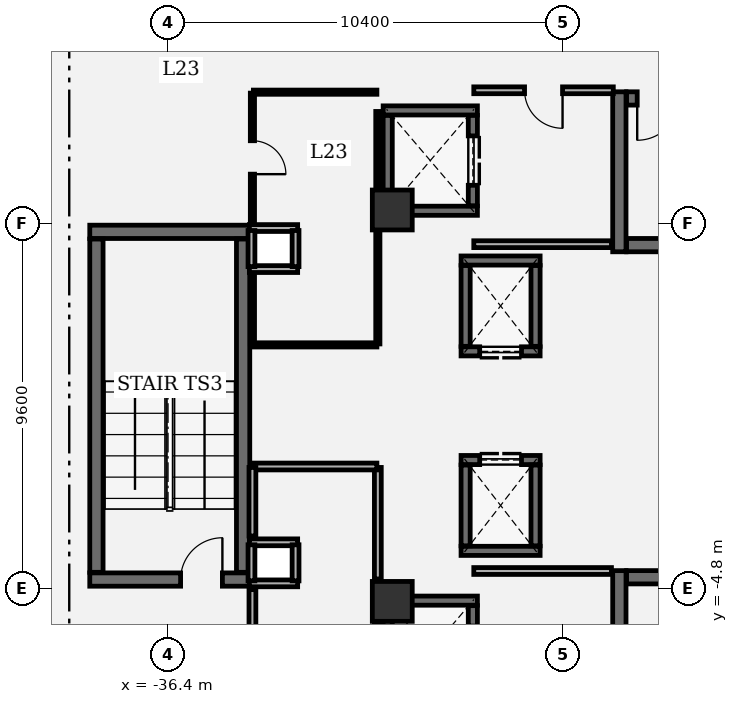
"""IFC4 building model, lengths in metres.
Left out: names, types, materials, properties, quantities, classifications, styles, units other than length and angle.
Written with IfcOpenShell. Run it as: python <this file> out.ifc"""

import sys

from ifc_helpers import new_model, si_unit, direction, frame, frame_2d, origin, origin_2d, place, context, subcontext, project, spatial, rectangle, extrude, element, fill, save


model = new_model("IFC4")
c1 = context("Model", 3, precision=1e-05, world=origin(), true_north=direction((0.0, 1.0)))
c2 = subcontext(c1, "Body", "Model", "MODEL_VIEW")
j1 = project(units=[si_unit("LENGTHUNIT", "METRE"), si_unit("PLANEANGLEUNIT", "RADIAN")], contexts=[c1])
p1 = place(None, origin())
s1 = spatial("IfcSite", under=j1, at=p1, CompositionType="ELEMENT")
p2 = place(p1, origin())
s2 = spatial("IfcBuilding", under=s1, at=p2, CompositionType="ELEMENT")
p3 = place(p2, frame((0.0, 0.0, 105.0)))
s3 = spatial("IfcBuildingStorey", under=s2, at=p3, CompositionType="ELEMENT", Elevation=105.0)
for number, where, z_axis, x_axis in (
    (1, (-30.5, 5.15, 0.0), (0.0, 0.0, 1.0), (1.0, 0.0, 0.0)),
    (2, (-30.5, -5.15, 0.0), (0.0, 0.0, 1.0), (1.0, 0.0, 0.0)),
):
    element("IfcColumn", number, at=place(p3, frame(where, z_axis=z_axis, x_axis=x_axis)), inside=s3, PredefinedType="COLUMN", context=c2, shape_type="SweptSolid", body=[
        extrude(rectangle(XDim=1.05, YDim=1.05, at=origin_2d()), origin(), (0.0, 0.0, 1.0), 4.8),
    ])
p4 = place(p3, frame((-24.525, 8.26, 0.0), z_axis=(0.0, 0.0, 1.0), x_axis=(0.0, -1.0, 0.0)))
e3 = element("IfcWall", 3, at=p4, inside=s3, PredefinedType="SHEAR", context=c2, shape_type="SweptSolid", body=[
    extrude(rectangle(XDim=4.21, YDim=0.35, at=frame_2d((2.105, 0.0))), origin(), (0.0, 0.0, 1.0), 4.52),
])
p5 = place(p3, frame((-24.335, 4.225, 0.0), z_axis=(0.0, 0.0, 1.0), x_axis=(1.0, 0.0, 0.0)))
e4 = element("IfcWall", 4, at=p5, inside=s3, PredefinedType="SHEAR", context=c2, shape_type="SweptSolid", body=[
    extrude(rectangle(XDim=8.12, YDim=0.35, at=frame_2d((4.06, 0.0))), origin(), (0.0, 0.0, 1.0), 4.52),
])
p6 = place(p3, frame((-16.215, 8.085, 0.0), z_axis=(0.0, 0.0, 1.0), x_axis=(-1.0, 0.0, 0.0)))
e5 = element("IfcWall", 5, at=p6, inside=s3, PredefinedType="SHEAR", context=c2, shape_type="SweptSolid", body=[
    extrude(rectangle(XDim=8.12, YDim=0.35, at=frame_2d((4.06, 0.0))), origin(), (0.0, 0.0, 1.0), 4.52),
])
p7 = place(p6, frame((6.74, 0.0, 0.0)))
e6 = element("IfcOpeningElement", 6, at=p7, cuts=e5, PredefinedType="OPENING", context=c2, shape_type="SweptSolid", body=[
    extrude(rectangle(XDim=1.1, YDim=2.2, at=frame_2d((0.55, 1.1))), frame((0.0, 0.185, 0.0), z_axis=(0.0, -1.0, 0.0), x_axis=(1.0, 0.0, 0.0)), (0.0, 0.0, 1.0), 0.37),
])
p8 = place(p3, frame((-24.525, -4.34, 0.0), z_axis=(0.0, 0.0, 1.0), x_axis=(0.0, -1.0, 0.0)))
e7 = element("IfcWall", 7, at=p8, inside=s3, PredefinedType="SHEAR", context=c2, shape_type="SweptSolid", body=[
    extrude(rectangle(XDim=4.21, YDim=0.35, at=frame_2d((2.105, 0.0))), origin(), (0.0, 0.0, 1.0), 4.52),
])
p9 = place(p3, frame((-16.215, -4.515, 0.0), z_axis=(0.0, 0.0, 1.0), x_axis=(-1.0, 0.0, 0.0)))
e8 = element("IfcWall", 8, at=p9, inside=s3, PredefinedType="SHEAR", context=c2, shape_type="SweptSolid", body=[
    extrude(rectangle(XDim=8.12, YDim=0.35, at=frame_2d((4.06, 0.0))), origin(), (0.0, 0.0, 1.0), 4.52),
])
p10 = place(p3, frame((-38.46, -4.575, 0.0), z_axis=(0.0, 0.0, 1.0), x_axis=(1.0, 0.0, 0.0)))
e9 = element("IfcWall", 9, at=p10, inside=s3, PredefinedType="SHEAR", context=c2, shape_type="SweptSolid", body=[
    extrude(rectangle(XDim=4.21, YDim=0.35, at=frame_2d((2.105, 0.0))), origin(), (0.0, 0.0, 1.0), 4.52),
])
p11 = place(p10, frame((2.39, 0.0, 0.0)))
e10 = element("IfcOpeningElement", 10, at=p11, cuts=e9, PredefinedType="OPENING", context=c2, shape_type="SweptSolid", body=[
    extrude(rectangle(XDim=1.1, YDim=2.2, at=frame_2d((0.55, 1.1))), frame((0.0, 0.185, 0.0), z_axis=(0.0, -1.0, 0.0), x_axis=(1.0, 0.0, 0.0)), (0.0, 0.0, 1.0), 0.37),
])
p12 = place(p3, frame((-34.25, 4.575, 0.0), z_axis=(0.0, 0.0, 1.0), x_axis=(-1.0, 0.0, 0.0)))
e11 = element("IfcWall", 11, at=p12, inside=s3, PredefinedType="SHEAR", context=c2, shape_type="SweptSolid", body=[
    extrude(rectangle(XDim=4.21, YDim=0.35, at=frame_2d((2.105, 0.0))), origin(), (0.0, 0.0, 1.0), 4.52),
])
for number, where, z_axis, x_axis in (
    (12, (-34.425, -4.385, 0.0), (0.0, 0.0, 1.0), (0.0, 1.0, 0.0)),
    (13, (-38.285, 4.385, 0.0), (0.0, 0.0, 1.0), (0.0, -1.0, 0.0)),
):
    element("IfcWall", number, at=place(p3, frame(where, z_axis=z_axis, x_axis=x_axis)), inside=s3, PredefinedType="SHEAR", context=c2, shape_type="SweptSolid", body=[
        extrude(rectangle(XDim=8.77, YDim=0.35, at=frame_2d((4.385, 0.0))), origin(), (0.0, 0.0, 1.0), 4.52),
    ])
for number, where, z_axis, x_axis in (
    (14, (-28.26, 5.13, 0.0), (0.0, 0.0, 1.0), (-1.0, 0.0, 0.0)),
    (15, (-30.74, 7.77, 0.0), (0.0, 0.0, 1.0), (1.0, 0.0, 0.0)),
):
    element("IfcWall", number, at=place(p3, frame(where, z_axis=z_axis, x_axis=x_axis)), inside=s3, PredefinedType="SHEAR", context=c2, shape_type="SweptSolid", body=[
        extrude(rectangle(XDim=2.48, YDim=0.24, at=frame_2d((1.24, 0.0))), origin(), (0.0, 0.0, 1.0), 4.52),
    ])
p13 = place(p3, frame((-30.62, 5.262, 0.0), z_axis=(0.0, 0.0, 1.0), x_axis=(0.0, 1.0, 0.0)))
e16 = element("IfcWall", 16, at=p13, inside=s3, PredefinedType="SHEAR", context=c2, shape_type="SweptSolid", body=[
    extrude(rectangle(XDim=2.376, YDim=0.24, at=frame_2d((1.188, 0.0))), origin(), (0.0, 0.0, 1.0), 4.52),
])
p14 = place(p3, frame((-28.38, 7.638, 0.0), z_axis=(0.0, 0.0, 1.0), x_axis=(0.0, -1.0, 0.0)))
e17 = element("IfcWall", 17, at=p14, inside=s3, PredefinedType="SHEAR", context=c2, shape_type="SweptSolid", body=[
    extrude(rectangle(XDim=2.376, YDim=0.24, at=frame_2d((1.188, 0.0))), origin(), (0.0, 0.0, 1.0), 4.52),
])
p15 = place(p14, frame((0.538, 0.0, 0.0)))
e18 = element("IfcOpeningElement", 18, at=p15, cuts=e17, PredefinedType="OPENING", context=c2, shape_type="SweptSolid", body=[
    extrude(rectangle(XDim=1.3, YDim=2.3, at=frame_2d((0.65, 1.15))), frame((0.0, 0.13, 0.0), z_axis=(0.0, -1.0, 0.0), x_axis=(1.0, 0.0, 0.0)), (0.0, 0.0, 1.0), 0.26),
])
p16 = place(p3, frame((-30.74, -5.13, 0.0), z_axis=(0.0, 0.0, 1.0), x_axis=(1.0, 0.0, 0.0)))
e19 = element("IfcWall", 19, at=p16, inside=s3, PredefinedType="SHEAR", context=c2, shape_type="SweptSolid", body=[
    extrude(rectangle(XDim=2.48, YDim=0.24, at=frame_2d((1.24, 0.0))), origin(), (0.0, 0.0, 1.0), 4.52),
])
p17 = place(p3, frame((-30.62, -7.638, 0.0), z_axis=(0.0, 0.0, 1.0), x_axis=(0.0, 1.0, 0.0)))
e20 = element("IfcWall", 20, at=p17, inside=s3, PredefinedType="SHEAR", context=c2, shape_type="SweptSolid", body=[
    extrude(rectangle(XDim=2.376, YDim=0.24, at=frame_2d((1.188, 0.0))), origin(), (0.0, 0.0, 1.0), 4.52),
])
p18 = place(p3, frame((-28.38, -5.262, 0.0), z_axis=(0.0, 0.0, 1.0), x_axis=(0.0, -1.0, 0.0)))
e21 = element("IfcWall", 21, at=p18, inside=s3, PredefinedType="SHEAR", context=c2, shape_type="SweptSolid", body=[
    extrude(rectangle(XDim=2.376, YDim=0.24, at=frame_2d((1.188, 0.0))), origin(), (0.0, 0.0, 1.0), 4.52),
])
p19 = place(p18, frame((0.538, 0.0, 0.0)))
e22 = element("IfcOpeningElement", 22, at=p19, cuts=e21, PredefinedType="OPENING", context=c2, shape_type="SweptSolid", body=[
    extrude(rectangle(XDim=1.3, YDim=2.3, at=frame_2d((0.65, 1.15))), frame((0.0, 0.13, 0.0), z_axis=(0.0, -1.0, 0.0), x_axis=(1.0, 0.0, 0.0)), (0.0, 0.0, 1.0), 0.26),
])
p20 = place(p3, frame((-26.61, 1.43, 0.0), z_axis=(0.0, 0.0, 1.0), x_axis=(-1.0, 0.0, 0.0)))
e23 = element("IfcWall", 23, at=p20, inside=s3, PredefinedType="SHEAR", context=c2, shape_type="SweptSolid", body=[
    extrude(rectangle(XDim=2.08, YDim=0.24, at=frame_2d((1.04, 0.0))), origin(), (0.0, 0.0, 1.0), 4.52),
])
p21 = place(p20, frame((0.49, 0.0, 0.0)))
e24 = element("IfcOpeningElement", 24, at=p21, cuts=e23, PredefinedType="OPENING", context=c2, shape_type="SweptSolid", body=[
    extrude(rectangle(XDim=1.1, YDim=2.2, at=frame_2d((0.55, 1.1))), frame((0.0, 0.13, 0.0), z_axis=(0.0, -1.0, 0.0), x_axis=(1.0, 0.0, 0.0)), (0.0, 0.0, 1.0), 0.26),
])
p22 = place(p3, frame((-28.69, 3.82, 0.0), z_axis=(0.0, 0.0, 1.0), x_axis=(1.0, 0.0, 0.0)))
e25 = element("IfcWall", 25, at=p22, inside=s3, PredefinedType="SHEAR", context=c2, shape_type="SweptSolid", body=[
    extrude(rectangle(XDim=2.08, YDim=0.24, at=frame_2d((1.04, 0.0))), origin(), (0.0, 0.0, 1.0), 4.52),
])
for number, where, z_axis, x_axis in (
    (26, (-28.57, 1.562, 0.0), (0.0, 0.0, 1.0), (0.0, 1.0, 0.0)),
    (27, (-26.73, 3.688, 0.0), (0.0, 0.0, 1.0), (0.0, -1.0, 0.0)),
):
    element("IfcWall", number, at=place(p3, frame(where, z_axis=z_axis, x_axis=x_axis)), inside=s3, PredefinedType="SHEAR", context=c2, shape_type="SweptSolid", body=[
        extrude(rectangle(XDim=2.126, YDim=0.24, at=frame_2d((1.063, 0.0))), origin(), (0.0, 0.0, 1.0), 4.52),
    ])
p23 = place(p3, frame((-26.61, -3.82, 0.0), z_axis=(0.0, 0.0, 1.0), x_axis=(-1.0, 0.0, 0.0)))
e28 = element("IfcWall", 28, at=p23, inside=s3, PredefinedType="SHEAR", context=c2, shape_type="SweptSolid", body=[
    extrude(rectangle(XDim=2.08, YDim=0.24, at=frame_2d((1.04, 0.0))), origin(), (0.0, 0.0, 1.0), 4.52),
])
p24 = place(p3, frame((-28.69, -1.43, 0.0), z_axis=(0.0, 0.0, 1.0), x_axis=(1.0, 0.0, 0.0)))
e29 = element("IfcWall", 29, at=p24, inside=s3, PredefinedType="SHEAR", context=c2, shape_type="SweptSolid", body=[
    extrude(rectangle(XDim=2.08, YDim=0.24, at=frame_2d((1.04, 0.0))), origin(), (0.0, 0.0, 1.0), 4.52),
])
p25 = place(p24, frame((0.49, 0.0, 0.0)))
e30 = element("IfcOpeningElement", 30, at=p25, cuts=e29, PredefinedType="OPENING", context=c2, shape_type="SweptSolid", body=[
    extrude(rectangle(XDim=1.1, YDim=2.2, at=frame_2d((0.55, 1.1))), frame((0.0, 0.13, 0.0), z_axis=(0.0, -1.0, 0.0), x_axis=(1.0, 0.0, 0.0)), (0.0, 0.0, 1.0), 0.26),
])
for number, where, z_axis, x_axis in (
    (31, (-28.57, -3.688, 0.0), (0.0, 0.0, 1.0), (0.0, 1.0, 0.0)),
    (32, (-26.73, -1.562, 0.0), (0.0, 0.0, 1.0), (0.0, -1.0, 0.0)),
):
    element("IfcWall", number, at=place(p3, frame(where, z_axis=z_axis, x_axis=x_axis)), inside=s3, PredefinedType="SHEAR", context=c2, shape_type="SweptSolid", body=[
        extrude(rectangle(XDim=2.126, YDim=0.24, at=frame_2d((1.063, 0.0))), origin(), (0.0, 0.0, 1.0), 4.52),
    ])
for number, where, z_axis, x_axis in (
    (33, (-32.99, 3.595, 0.0), (0.0, 0.0, 1.0), (-1.0, 0.0, 0.0)),
    (34, (-34.26, 4.675, 0.0), (0.0, 0.0, 1.0), (1.0, 0.0, 0.0)),
):
    element("IfcWall", number, at=place(p3, frame(where, z_axis=z_axis, x_axis=x_axis)), inside=s3, PredefinedType="PARTITIONING", context=c2, shape_type="SweptSolid", body=[
        extrude(rectangle(XDim=1.27, YDim=0.18, at=frame_2d((0.635, 0.0))), origin(), (0.0, 0.0, 1.0), 4.52),
    ])
for number, where, z_axis, x_axis in (
    (35, (-34.205, 3.66, 0.0), (0.0, 0.0, 1.0), (0.0, 1.0, 0.0)),
    (36, (-33.045, 4.61, 0.0), (0.0, 0.0, 1.0), (0.0, -1.0, 0.0)),
):
    element("IfcWall", number, at=place(p3, frame(where, z_axis=z_axis, x_axis=x_axis)), inside=s3, PredefinedType="PARTITIONING", context=c2, shape_type="SweptSolid", body=[
        extrude(rectangle(XDim=0.95, YDim=0.18, at=frame_2d((0.475, 0.0))), origin(), (0.0, 0.0, 1.0), 4.52),
    ])
for number, where, z_axis, x_axis in (
    (37, (-32.99, -4.675, 0.0), (0.0, 0.0, 1.0), (-1.0, 0.0, 0.0)),
    (38, (-34.26, -3.595, 0.0), (0.0, 0.0, 1.0), (1.0, 0.0, 0.0)),
):
    element("IfcWall", number, at=place(p3, frame(where, z_axis=z_axis, x_axis=x_axis)), inside=s3, PredefinedType="PARTITIONING", context=c2, shape_type="SweptSolid", body=[
        extrude(rectangle(XDim=1.27, YDim=0.18, at=frame_2d((0.635, 0.0))), origin(), (0.0, 0.0, 1.0), 4.52),
    ])
for number, where, z_axis, x_axis in (
    (39, (-34.205, -4.61, 0.0), (0.0, 0.0, 1.0), (0.0, 1.0, 0.0)),
    (40, (-33.045, -3.66, 0.0), (0.0, 0.0, 1.0), (0.0, -1.0, 0.0)),
):
    element("IfcWall", number, at=place(p3, frame(where, z_axis=z_axis, x_axis=x_axis)), inside=s3, PredefinedType="PARTITIONING", context=c2, shape_type="SweptSolid", body=[
        extrude(rectangle(XDim=0.95, YDim=0.18, at=frame_2d((0.475, 0.0))), origin(), (0.0, 0.0, 1.0), 4.52),
    ])
p26 = place(p3, frame((-28.355, 4.25, 0.0), z_axis=(0.0, 0.0, 1.0), x_axis=(1.0, 0.0, 0.0)))
e41 = element("IfcWall", 41, at=p26, inside=s3, PredefinedType="PARTITIONING", context=c2, shape_type="SweptSolid", body=[
    extrude(rectangle(XDim=3.622, YDim=0.18, at=frame_2d((1.811, 0.0))), origin(), (0.0, 0.0, 1.0), 4.52),
])
p27 = place(p3, frame((-24.684, 8.3, 0.0), z_axis=(0.0, 0.0, 1.0), x_axis=(-1.0, 0.0, 0.0)))
e42 = element("IfcWall", 42, at=p27, inside=s3, PredefinedType="PARTITIONING", context=c2, shape_type="SweptSolid", body=[
    extrude(rectangle(XDim=3.671, YDim=0.18, at=frame_2d((1.835, 0.0))), origin(), (0.0, 0.0, 1.0), 4.52),
])
p28 = place(p27, frame((1.335, 0.0, 0.0)))
e43 = element("IfcOpeningElement", 43, at=p28, cuts=e42, PredefinedType="OPENING", context=c2, shape_type="SweptSolid", body=[
    extrude(rectangle(XDim=1.0, YDim=2.15, at=frame_2d((0.5, 1.075))), frame((0.0, 0.1, 0.0), z_axis=(0.0, -1.0, 0.0), x_axis=(1.0, 0.0, 0.0)), (0.0, 0.0, 1.0), 0.2),
])
p29 = place(p3, frame((-24.733, -4.35, 0.0), z_axis=(0.0, 0.0, 1.0), x_axis=(-1.0, 0.0, 0.0)))
e44 = element("IfcWall", 44, at=p29, inside=s3, PredefinedType="PARTITIONING", context=c2, shape_type="SweptSolid", body=[
    extrude(rectangle(XDim=3.622, YDim=0.18, at=frame_2d((1.811, 0.0))), origin(), (0.0, 0.0, 1.0), 4.52),
])
p30 = place(p3, frame((-34.155, 1.6, 0.0), z_axis=(0.0, 0.0, 1.0), x_axis=(1.0, 0.0, 0.0)))
e45 = element("IfcWall", 45, at=p30, inside=s3, PredefinedType="PARTITIONING", context=c2, shape_type="SweptSolid", body=[
    extrude(rectangle(XDim=3.25, YDim=0.11, at=frame_2d((1.625, 0.0))), origin(), (0.0, 0.0, 1.0), 4.52),
])
p31 = place(p3, frame((-30.88, 1.625, 0.0), z_axis=(0.0, 0.0, 1.0), x_axis=(0.0, 1.0, 0.0)))
e46 = element("IfcWall", 46, at=p31, inside=s3, PredefinedType="PARTITIONING", context=c2, shape_type="SweptSolid", body=[
    extrude(rectangle(XDim=2.935, YDim=0.11, at=frame_2d((1.468, 0.0))), origin(), (0.0, 0.0, 1.0), 4.52),
])
p32 = place(p3, frame((-30.88, 5.74, 0.0), z_axis=(0.0, 0.0, 1.0), x_axis=(0.0, 1.0, 0.0)))
e47 = element("IfcWall", 47, at=p32, inside=s3, PredefinedType="PARTITIONING", context=c2, shape_type="SweptSolid", body=[
    extrude(rectangle(XDim=2.003, YDim=0.11, at=frame_2d((1.001, 0.0))), origin(), (0.0, 0.0, 1.0), 4.52),
])
p33 = place(p3, frame((-30.905, 8.25, 0.0), z_axis=(0.0, 0.0, 1.0), x_axis=(-1.0, 0.0, 0.0)))
e48 = element("IfcWall", 48, at=p33, inside=s3, PredefinedType="PARTITIONING", context=c2, shape_type="SweptSolid", body=[
    extrude(rectangle(XDim=3.25, YDim=0.11, at=frame_2d((1.625, 0.0))), origin(), (0.0, 0.0, 1.0), 4.52),
])
p34 = place(p3, frame((-34.18, 8.225, 0.0), z_axis=(0.0, 0.0, 1.0), x_axis=(0.0, -1.0, 0.0)))
e49 = element("IfcWall", 49, at=p34, inside=s3, PredefinedType="PARTITIONING", context=c2, shape_type="SweptSolid", body=[
    extrude(rectangle(XDim=3.385, YDim=0.11, at=frame_2d((1.692, 0.0))), origin(), (0.0, 0.0, 1.0), 4.52),
])
p35 = place(p34, frame((1.252, 0.0, 0.0)))
e50 = element("IfcOpeningElement", 50, at=p35, cuts=e49, PredefinedType="OPENING", context=c2, shape_type="SweptSolid", body=[
    extrude(rectangle(XDim=0.88, YDim=2.1, at=frame_2d((0.44, 1.05))), frame((0.0, 0.065, 0.0), z_axis=(0.0, -1.0, 0.0), x_axis=(1.0, 0.0, 0.0)), (0.0, 0.0, 1.0), 0.13),
])
p36 = place(p3, frame((-34.18, 3.43, 0.0), z_axis=(0.0, 0.0, 1.0), x_axis=(0.0, -1.0, 0.0)))
e51 = element("IfcWall", 51, at=p36, inside=s3, PredefinedType="PARTITIONING", context=c2, shape_type="SweptSolid", body=[
    extrude(rectangle(XDim=1.805, YDim=0.11, at=frame_2d((0.902, 0.0))), origin(), (0.0, 0.0, 1.0), 4.52),
])
p37 = place(p3, frame((-30.88, -7.743, 0.0), z_axis=(0.0, 0.0, 1.0), x_axis=(0.0, 1.0, 0.0)))
e52 = element("IfcWall", 52, at=p37, inside=s3, PredefinedType="PARTITIONING", context=c2, shape_type="SweptSolid", body=[
    extrude(rectangle(XDim=2.003, YDim=0.18, at=frame_2d((1.001, 0.0))), origin(), (0.0, 0.0, 1.0), 4.52),
])
p38 = place(p3, frame((-30.88, -4.56, 0.0), z_axis=(0.0, 0.0, 1.0), x_axis=(0.0, 1.0, 0.0)))
e53 = element("IfcWall", 53, at=p38, inside=s3, PredefinedType="PARTITIONING", context=c2, shape_type="SweptSolid", body=[
    extrude(rectangle(XDim=2.935, YDim=0.18, at=frame_2d((1.468, 0.0))), origin(), (0.0, 0.0, 1.0), 4.52),
])
p39 = place(p3, frame((-30.905, -1.6, 0.0), z_axis=(0.0, 0.0, 1.0), x_axis=(-1.0, 0.0, 0.0)))
e54 = element("IfcWall", 54, at=p39, inside=s3, PredefinedType="PARTITIONING", context=c2, shape_type="SweptSolid", body=[
    extrude(rectangle(XDim=3.25, YDim=0.18, at=frame_2d((1.625, 0.0))), origin(), (0.0, 0.0, 1.0), 4.52),
])
p40 = place(p3, frame((-34.18, -1.625, 0.0), z_axis=(0.0, 0.0, 1.0), x_axis=(0.0, -1.0, 0.0)))
e55 = element("IfcWall", 55, at=p40, inside=s3, PredefinedType="PARTITIONING", context=c2, shape_type="SweptSolid", body=[
    extrude(rectangle(XDim=1.805, YDim=0.18, at=frame_2d((0.902, 0.0))), origin(), (0.0, 0.0, 1.0), 4.52),
])
p41 = place(p3, frame((-34.18, -4.84, 0.0), z_axis=(0.0, 0.0, 1.0), x_axis=(0.0, -1.0, 0.0)))
e56 = element("IfcWall", 56, at=p41, inside=s3, PredefinedType="PARTITIONING", context=c2, shape_type="SweptSolid", body=[
    extrude(rectangle(XDim=3.485, YDim=0.18, at=frame_2d((1.743, 0.0))), origin(), (0.0, 0.0, 1.0), 4.52),
])
p42 = place(p41, frame((1.302, 0.0, 0.0)))
e57 = element("IfcOpeningElement", 57, at=p42, cuts=e56, PredefinedType="OPENING", context=c2, shape_type="SweptSolid", body=[
    extrude(rectangle(XDim=0.88, YDim=2.1, at=frame_2d((0.44, 1.05))), frame((0.0, 0.1, 0.0), z_axis=(0.0, -1.0, 0.0), x_axis=(1.0, 0.0, 0.0)), (0.0, 0.0, 1.0), 0.2),
])
p43 = place(p7, origin())
e58 = element("IfcDoor", 58, at=p43, inside=s3, OperationType="SINGLE_SWING_RIGHT", PredefinedType="DOOR", context=c2, shape_type="SweptSolid", body=[
    extrude(rectangle(XDim=1.1, YDim=2.2, at=frame_2d((0.55, 1.1))), frame((0.0, 0.025, 0.0), z_axis=(0.0, -1.0, 0.0), x_axis=(1.0, 0.0, 0.0)), (0.0, 0.0, 1.0), 0.05),
])
fill(e6, e58)
p44 = place(p11, origin())
e59 = element("IfcDoor", 59, at=p44, inside=s3, OperationType="SINGLE_SWING_RIGHT", PredefinedType="DOOR", context=c2, shape_type="SweptSolid", body=[
    extrude(rectangle(XDim=1.1, YDim=2.2, at=frame_2d((0.55, 1.1))), frame((0.0, 0.025, 0.0), z_axis=(0.0, -1.0, 0.0), x_axis=(1.0, 0.0, 0.0)), (0.0, 0.0, 1.0), 0.05),
])
fill(e10, e59)
p45 = place(p15, origin())
e60 = element("IfcDoor", 60, at=p45, inside=s3, OperationType="DOUBLE_DOOR_SLIDING", PredefinedType="DOOR", context=c2, shape_type="SweptSolid", body=[
    extrude(rectangle(XDim=1.3, YDim=2.3, at=frame_2d((0.65, 1.15))), frame((0.0, 0.025, 0.0), z_axis=(0.0, -1.0, 0.0), x_axis=(1.0, 0.0, 0.0)), (0.0, 0.0, 1.0), 0.05),
])
fill(e18, e60)
p46 = place(p21, origin())
e61 = element("IfcDoor", 61, at=p46, inside=s3, OperationType="DOUBLE_DOOR_SLIDING", PredefinedType="DOOR", context=c2, shape_type="SweptSolid", body=[
    extrude(rectangle(XDim=1.1, YDim=2.2, at=frame_2d((0.55, 1.1))), frame((0.0, 0.025, 0.0), z_axis=(0.0, -1.0, 0.0), x_axis=(1.0, 0.0, 0.0)), (0.0, 0.0, 1.0), 0.05),
])
fill(e24, e61)
p47 = place(p25, origin())
e62 = element("IfcDoor", 62, at=p47, inside=s3, OperationType="DOUBLE_DOOR_SLIDING", PredefinedType="DOOR", context=c2, shape_type="SweptSolid", body=[
    extrude(rectangle(XDim=1.1, YDim=2.2, at=frame_2d((0.55, 1.1))), frame((0.0, 0.025, 0.0), z_axis=(0.0, -1.0, 0.0), x_axis=(1.0, 0.0, 0.0)), (0.0, 0.0, 1.0), 0.05),
])
fill(e30, e62)
p48 = place(p35, origin())
e63 = element("IfcDoor", 63, at=p48, inside=s3, OperationType="SINGLE_SWING_RIGHT", PredefinedType="DOOR", context=c2, shape_type="SweptSolid", body=[
    extrude(rectangle(XDim=0.88, YDim=2.1, at=frame_2d((0.44, 1.05))), frame((0.0, 0.025, 0.0), z_axis=(0.0, -1.0, 0.0), x_axis=(1.0, 0.0, 0.0)), (0.0, 0.0, 1.0), 0.05),
])
fill(e50, e63)
p49 = place(p28, origin())
e64 = element("IfcDoor", 64, at=p49, inside=s3, OperationType="SINGLE_SWING_LEFT", PredefinedType="DOOR", context=c2, shape_type="SweptSolid", body=[
    extrude(rectangle(XDim=1.0, YDim=2.15, at=frame_2d((0.5, 1.075))), frame((0.0, 0.025, 0.0), z_axis=(0.0, -1.0, 0.0), x_axis=(1.0, 0.0, 0.0)), (0.0, 0.0, 1.0), 0.05),
])
fill(e43, e64)
save(model, sys.argv[1])
